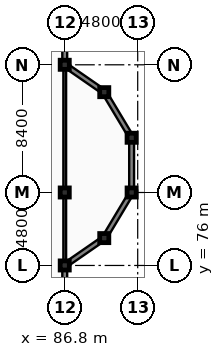
"""IFC4 building model, lengths in metres.
Left out: names, types, materials, properties, quantities, classifications, styles, units other than length and angle.
Written with IfcOpenShell. Run it as: python <this file> out.ifc"""

import sys

from ifc_helpers import new_model, si_unit, direction, frame, frame_2d, origin, origin_2d, place, context, subcontext, project, spatial, rectangle, extrude, element, fill, save


model = new_model("IFC4")
c1 = context("Model", 3, precision=1e-05, world=origin(), true_north=direction((0.0, 1.0)))
c2 = subcontext(c1, "Body", "Model", "MODEL_VIEW")
j1 = project(units=[si_unit("LENGTHUNIT", "METRE"), si_unit("PLANEANGLEUNIT", "RADIAN")], contexts=[c1])
p1 = place(None, origin())
s1 = spatial("IfcSite", under=j1, at=p1, CompositionType="ELEMENT")
p2 = place(p1, origin())
s2 = spatial("IfcBuilding", under=s1, at=p2, CompositionType="ELEMENT")
p3 = place(p2, origin())
s3 = spatial("IfcBuildingStorey", under=s2, at=p3, CompositionType="ELEMENT", Elevation=0.0)
for number, where, z_axis, x_axis in (
    (1, (86.8, 76.0, 0.0), (0.0, 0.0, 1.0), (1.0, 0.0, 0.0)),
    (2, (86.8, 80.8, 0.0), (0.0, 0.0, 1.0), (1.0, 0.0, 0.0)),
    (3, (86.8, 89.2, 0.0), (0.0, 0.0, 1.0), (1.0, 0.0, 0.0)),
    (4, (89.4, 77.8, 0.0), (0.0, 0.0, 1.0), (1.0, 0.0, 0.0)),
    (5, (89.4, 87.4, 0.0), (0.0, 0.0, 1.0), (1.0, 0.0, 0.0)),
    (6, (91.2, 80.8, 0.0), (0.0, 0.0, 1.0), (1.0, 0.0, 0.0)),
    (7, (91.2, 84.4, 0.0), (0.0, 0.0, 1.0), (1.0, 0.0, 0.0)),
):
    element("IfcColumn", number, at=place(p3, frame(where, z_axis=z_axis, x_axis=x_axis)), inside=s3, PredefinedType="COLUMN", context=c2, shape_type="SweptSolid", body=[
        extrude(rectangle(XDim=0.6, YDim=0.6, at=origin_2d()), origin(), (0.0, 0.0, 1.0), 5.4),
    ])
p4 = place(p3, frame((86.8, 76.0, 0.0), z_axis=(0.0, 0.0, 1.0), x_axis=(0.0, 1.0, 0.0)))
e8 = element("IfcWall", 8, at=p4, inside=s3, PredefinedType="PARTITIONING", context=c2, shape_type="SweptSolid", body=[
    extrude(rectangle(XDim=13.2, YDim=0.18, at=frame_2d((6.6, 0.0))), origin(), (0.0, 0.0, 1.0), 4.54),
])
p5 = place(p4, frame((5.8, 0.0, -0.01)))
e9 = element("IfcOpeningElement", 9, at=p5, cuts=e8, PredefinedType="OPENING", context=c2, shape_type="SweptSolid", body=[
    extrude(rectangle(XDim=1.6, YDim=2.21, at=frame_2d((0.8, 1.105))), frame((0.0, 0.1, 0.0), z_axis=(0.0, -1.0, 0.0), x_axis=(1.0, 0.0, 0.0)), (0.0, 0.0, 1.0), 0.2),
])
p6 = place(p3, frame((86.8, 67.6, 0.0), z_axis=(0.0, 0.0, 1.0), x_axis=(0.0, 1.0, 0.0)))
e10 = element("IfcWall", 10, at=p6, inside=s3, PredefinedType="SOLIDWALL", context=c2, shape_type="SweptSolid", body=[
    extrude(rectangle(XDim=8.4, YDim=0.32, at=frame_2d((4.2, 0.0))), origin(), (0.0, 0.0, 1.0), 4.54),
])
p7 = place(p6, frame((0.46, 0.0, 0.9)))
e11 = element("IfcOpeningElement", 11, at=p7, cuts=e10, PredefinedType="OPENING", context=c2, shape_type="SweptSolid", body=[
    extrude(rectangle(XDim=2.4, YDim=2.35, at=frame_2d((1.2, 1.175))), frame((0.0, 0.17, 0.0), z_axis=(0.0, -1.0, 0.0), x_axis=(1.0, 0.0, 0.0)), (0.0, 0.0, 1.0), 0.34),
])
p8 = place(p6, frame((5.46, 0.0, 0.9)))
e12 = element("IfcOpeningElement", 12, at=p8, cuts=e10, PredefinedType="OPENING", context=c2, shape_type="SweptSolid", body=[
    extrude(rectangle(XDim=2.4, YDim=2.35, at=frame_2d((1.2, 1.175))), frame((0.0, 0.17, 0.0), z_axis=(0.0, -1.0, 0.0), x_axis=(1.0, 0.0, 0.0)), (0.0, 0.0, 1.0), 0.34),
])
p9 = place(p3, frame((86.8, 89.2, 0.0), z_axis=(0.0, 0.0, 1.0), x_axis=(0.0, 1.0, 0.0)))
e13 = element("IfcWall", 13, at=p9, inside=s3, PredefinedType="SOLIDWALL", context=c2, shape_type="SweptSolid", body=[
    extrude(rectangle(XDim=8.4, YDim=0.32, at=frame_2d((4.2, 0.0))), origin(), (0.0, 0.0, 1.0), 4.54),
])
p10 = place(p9, frame((0.46, 0.0, 0.9)))
e14 = element("IfcOpeningElement", 14, at=p10, cuts=e13, PredefinedType="OPENING", context=c2, shape_type="SweptSolid", body=[
    extrude(rectangle(XDim=2.4, YDim=2.35, at=frame_2d((1.2, 1.175))), frame((0.0, 0.17, 0.0), z_axis=(0.0, -1.0, 0.0), x_axis=(1.0, 0.0, 0.0)), (0.0, 0.0, 1.0), 0.34),
])
p11 = place(p9, frame((5.46, 0.0, 0.9)))
e15 = element("IfcOpeningElement", 15, at=p11, cuts=e13, PredefinedType="OPENING", context=c2, shape_type="SweptSolid", body=[
    extrude(rectangle(XDim=2.4, YDim=2.35, at=frame_2d((1.2, 1.175))), frame((0.0, 0.17, 0.0), z_axis=(0.0, -1.0, 0.0), x_axis=(1.0, 0.0, 0.0)), (0.0, 0.0, 1.0), 0.34),
])
p12 = place(p3, frame((86.8, 76.0, 0.0), z_axis=(0.0, 0.0, 1.0), x_axis=(0.8221699556, 0.569242096219, 0.0)))
e16 = element("IfcWall", 16, at=p12, inside=s3, PredefinedType="SOLIDWALL", context=c2, shape_type="SweptSolid", body=[
    extrude(rectangle(XDim=3.162, YDim=0.32, at=frame_2d((1.581, 0.0))), origin(), (0.0, 0.0, 1.0), 4.54),
])
p13 = place(p12, frame((1.06, 0.0, 0.9)))
e17 = element("IfcOpeningElement", 17, at=p13, cuts=e16, PredefinedType="OPENING", context=c2, shape_type="SweptSolid", body=[
    extrude(rectangle(XDim=1.2, YDim=2.35, at=frame_2d((0.6, 1.175))), frame((0.0, 0.17, 0.0), z_axis=(0.0, -1.0, 0.0), x_axis=(1.0, 0.0, 0.0)), (0.0, 0.0, 1.0), 0.34),
])
p14 = place(p3, frame((89.4, 77.8, 0.0), z_axis=(0.0, 0.0, 1.0), x_axis=(0.514506017516, 0.857486768376, 0.0)))
e18 = element("IfcWall", 18, at=p14, inside=s3, PredefinedType="SOLIDWALL", context=c2, shape_type="SweptSolid", body=[
    extrude(rectangle(XDim=3.499, YDim=0.32, at=frame_2d((1.749, 0.0))), origin(), (0.0, 0.0, 1.0), 4.54),
])
p15 = place(p14, frame((1.06, 0.0, 0.9)))
e19 = element("IfcOpeningElement", 19, at=p15, cuts=e18, PredefinedType="OPENING", context=c2, shape_type="SweptSolid", body=[
    extrude(rectangle(XDim=1.2, YDim=2.35, at=frame_2d((0.6, 1.175))), frame((0.0, 0.17, 0.0), z_axis=(0.0, -1.0, 0.0), x_axis=(1.0, 0.0, 0.0)), (0.0, 0.0, 1.0), 0.34),
])
p16 = place(p3, frame((91.2, 80.8, 0.0), z_axis=(0.0, 0.0, 1.0), x_axis=(0.0, 1.0, 0.0)))
e20 = element("IfcWall", 20, at=p16, inside=s3, PredefinedType="SOLIDWALL", context=c2, shape_type="SweptSolid", body=[
    extrude(rectangle(XDim=3.6, YDim=0.32, at=frame_2d((1.8, 0.0))), origin(), (0.0, 0.0, 1.0), 4.54),
])
p17 = place(p16, frame((1.26, 0.0, 0.9)))
e21 = element("IfcOpeningElement", 21, at=p17, cuts=e20, PredefinedType="OPENING", context=c2, shape_type="SweptSolid", body=[
    extrude(rectangle(XDim=1.2, YDim=2.35, at=frame_2d((0.6, 1.175))), frame((0.0, 0.17, 0.0), z_axis=(0.0, -1.0, 0.0), x_axis=(1.0, 0.0, 0.0)), (0.0, 0.0, 1.0), 0.34),
])
p18 = place(p3, frame((91.2, 84.4, 0.0), z_axis=(0.0, 0.0, 1.0), x_axis=(-0.514506017516, 0.857486768376, 0.0)))
e22 = element("IfcWall", 22, at=p18, inside=s3, PredefinedType="SOLIDWALL", context=c2, shape_type="SweptSolid", body=[
    extrude(rectangle(XDim=3.499, YDim=0.32, at=frame_2d((1.749, 0.0))), origin(), (0.0, 0.0, 1.0), 4.54),
])
p19 = place(p18, frame((1.06, 0.0, 0.9)))
e23 = element("IfcOpeningElement", 23, at=p19, cuts=e22, PredefinedType="OPENING", context=c2, shape_type="SweptSolid", body=[
    extrude(rectangle(XDim=1.2, YDim=2.35, at=frame_2d((0.6, 1.175))), frame((0.0, 0.17, 0.0), z_axis=(0.0, -1.0, 0.0), x_axis=(1.0, 0.0, 0.0)), (0.0, 0.0, 1.0), 0.34),
])
p20 = place(p3, frame((89.4, 87.4, 0.0), z_axis=(0.0, 0.0, 1.0), x_axis=(-0.8221699556, 0.569242096219, 0.0)))
e24 = element("IfcWall", 24, at=p20, inside=s3, PredefinedType="SOLIDWALL", context=c2, shape_type="SweptSolid", body=[
    extrude(rectangle(XDim=3.162, YDim=0.32, at=frame_2d((1.581, 0.0))), origin(), (0.0, 0.0, 1.0), 4.54),
])
p21 = place(p20, frame((1.06, 0.0, 0.9)))
e25 = element("IfcOpeningElement", 25, at=p21, cuts=e24, PredefinedType="OPENING", context=c2, shape_type="SweptSolid", body=[
    extrude(rectangle(XDim=1.2, YDim=2.35, at=frame_2d((0.6, 1.175))), frame((0.0, 0.17, 0.0), z_axis=(0.0, -1.0, 0.0), x_axis=(1.0, 0.0, 0.0)), (0.0, 0.0, 1.0), 0.34),
])
p22 = place(p5, frame((0.0, 0.0, 0.01)))
e26 = element("IfcDoor", 26, at=p22, inside=s3, OperationType="DOUBLE_SWING_LEFT", PredefinedType="DOOR", context=c2, shape_type="SweptSolid", body=[
    extrude(rectangle(XDim=1.6, YDim=2.2, at=frame_2d((0.8, 1.1))), frame((0.0, 0.025, 0.0), z_axis=(0.0, -1.0, 0.0), x_axis=(1.0, 0.0, 0.0)), (0.0, 0.0, 1.0), 0.05),
])
fill(e9, e26)
p23 = place(p8, origin())
e27 = element("IfcWindow", 27, at=p23, inside=s3, PartitioningType="TRIPLE_PANEL_VERTICAL", PredefinedType="WINDOW", context=c2, shape_type="SweptSolid", body=[
    extrude(rectangle(XDim=2.4, YDim=2.35, at=frame_2d((1.2, 1.175))), frame((0.0, 0.03, 0.0), z_axis=(0.0, -1.0, 0.0), x_axis=(1.0, 0.0, 0.0)), (0.0, 0.0, 1.0), 0.06),
])
fill(e12, e27)
p24 = place(p10, origin())
e28 = element("IfcWindow", 28, at=p24, inside=s3, PartitioningType="TRIPLE_PANEL_VERTICAL", PredefinedType="WINDOW", context=c2, shape_type="SweptSolid", body=[
    extrude(rectangle(XDim=2.4, YDim=2.35, at=frame_2d((1.2, 1.175))), frame((0.0, 0.03, 0.0), z_axis=(0.0, -1.0, 0.0), x_axis=(1.0, 0.0, 0.0)), (0.0, 0.0, 1.0), 0.06),
])
fill(e14, e28)
p25 = place(p13, origin())
e29 = element("IfcWindow", 29, at=p25, inside=s3, PartitioningType="SINGLE_PANEL", PredefinedType="WINDOW", context=c2, shape_type="SweptSolid", body=[
    extrude(rectangle(XDim=1.2, YDim=2.35, at=frame_2d((0.6, 1.175))), frame((0.0, 0.03, 0.0), z_axis=(0.0, -1.0, 0.0), x_axis=(1.0, 0.0, 0.0)), (0.0, 0.0, 1.0), 0.06),
])
fill(e17, e29)
p26 = place(p15, origin())
e30 = element("IfcWindow", 30, at=p26, inside=s3, PartitioningType="SINGLE_PANEL", PredefinedType="WINDOW", context=c2, shape_type="SweptSolid", body=[
    extrude(rectangle(XDim=1.2, YDim=2.35, at=frame_2d((0.6, 1.175))), frame((0.0, 0.03, 0.0), z_axis=(0.0, -1.0, 0.0), x_axis=(1.0, 0.0, 0.0)), (0.0, 0.0, 1.0), 0.06),
])
fill(e19, e30)
p27 = place(p17, origin())
e31 = element("IfcWindow", 31, at=p27, inside=s3, PartitioningType="SINGLE_PANEL", PredefinedType="WINDOW", context=c2, shape_type="SweptSolid", body=[
    extrude(rectangle(XDim=1.2, YDim=2.35, at=frame_2d((0.6, 1.175))), frame((0.0, 0.03, 0.0), z_axis=(0.0, -1.0, 0.0), x_axis=(1.0, 0.0, 0.0)), (0.0, 0.0, 1.0), 0.06),
])
fill(e21, e31)
p28 = place(p19, origin())
e32 = element("IfcWindow", 32, at=p28, inside=s3, PartitioningType="SINGLE_PANEL", PredefinedType="WINDOW", context=c2, shape_type="SweptSolid", body=[
    extrude(rectangle(XDim=1.2, YDim=2.35, at=frame_2d((0.6, 1.175))), frame((0.0, 0.03, 0.0), z_axis=(0.0, -1.0, 0.0), x_axis=(1.0, 0.0, 0.0)), (0.0, 0.0, 1.0), 0.06),
])
fill(e23, e32)
p29 = place(p21, origin())
e33 = element("IfcWindow", 33, at=p29, inside=s3, PartitioningType="SINGLE_PANEL", PredefinedType="WINDOW", context=c2, shape_type="SweptSolid", body=[
    extrude(rectangle(XDim=1.2, YDim=2.35, at=frame_2d((0.6, 1.175))), frame((0.0, 0.03, 0.0), z_axis=(0.0, -1.0, 0.0), x_axis=(1.0, 0.0, 0.0)), (0.0, 0.0, 1.0), 0.06),
])
fill(e25, e33)
save(model, sys.argv[1])
